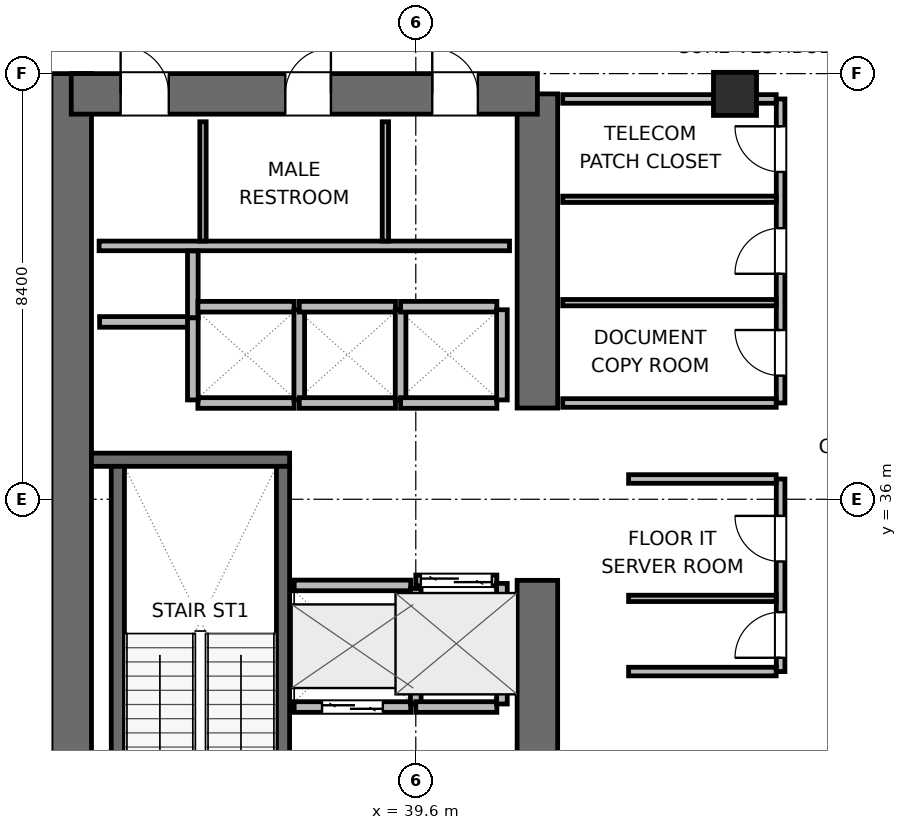
"""IFC4 building model, lengths in metres.
Left out: names, types, materials, properties, quantities, classifications, styles, units other than length and angle.
Written with IfcOpenShell. Run it as: python <this file> out.ifc"""

import sys

from ifc_helpers import new_model, si_unit, direction, frame, frame_2d, origin, origin_2d, place, context, subcontext, project, spatial, rectangle, extrude, element, fill, save


model = new_model("IFC4")
c1 = context("Model", 3, precision=1e-05, world=origin(), true_north=direction((0.0, 1.0)))
c2 = subcontext(c1, "Body", "Model", "MODEL_VIEW")
j1 = project(units=[si_unit("LENGTHUNIT", "METRE"), si_unit("PLANEANGLEUNIT", "RADIAN")], contexts=[c1])
p1 = place(None, origin())
s1 = spatial("IfcSite", under=j1, at=p1, CompositionType="ELEMENT")
p2 = place(p1, origin())
s2 = spatial("IfcBuilding", under=s1, at=p2, CompositionType="ELEMENT")
p3 = place(p2, frame((0.0, 0.0, 101.4)))
s3 = spatial("IfcBuildingStorey", under=s2, at=p3, CompositionType="ELEMENT", Elevation=101.4)
p4 = place(p3, frame((32.8, 27.6, 0.0), z_axis=(0.0, 0.0, 1.0), x_axis=(0.0, 1.0, 0.0)))
e1 = element("IfcWall", 1, at=p4, inside=s3, PredefinedType="SHEAR", context=c2, shape_type="SweptSolid", body=[
    extrude(rectangle(XDim=16.8, YDim=0.8, at=frame_2d((8.4, 0.0))), origin(), (0.0, 0.0, 1.0), 3.9),
])
p5 = place(p3, frame((42.0, 28.0, 0.0), z_axis=(0.0, 0.0, 1.0), x_axis=(0.0, 1.0, 0.0)))
e2 = element("IfcWall", 2, at=p5, inside=s3, PredefinedType="SHEAR", context=c2, shape_type="SweptSolid", body=[
    extrude(rectangle(XDim=6.4, YDim=0.8, at=frame_2d((3.2, 0.0))), origin(), (0.0, 0.0, 1.0), 3.9),
])
p6 = place(p3, frame((42.0, 37.8, 0.0), z_axis=(0.0, 0.0, 1.0), x_axis=(0.0, 1.0, 0.0)))
e3 = element("IfcWall", 3, at=p6, inside=s3, PredefinedType="SHEAR", context=c2, shape_type="SweptSolid", body=[
    extrude(rectangle(XDim=6.2, YDim=0.8, at=frame_2d((3.1, 0.0))), origin(), (0.0, 0.0, 1.0), 3.9),
])
p7 = place(p3, frame((32.8, 44.0, 0.0), z_axis=(0.0, 0.0, 1.0), x_axis=(1.0, 0.0, 0.0)))
e4 = element("IfcWall", 4, at=p7, inside=s3, PredefinedType="SHEAR", context=c2, shape_type="SweptSolid", body=[
    extrude(rectangle(XDim=9.2, YDim=0.8, at=frame_2d((4.6, 0.0))), origin(), (0.0, 0.0, 1.0), 3.9),
])
p8 = place(p7, frame((0.975, 0.0, 0.0)))
e5 = element("IfcOpeningElement", 5, at=p8, cuts=e4, PredefinedType="OPENING", context=c2, shape_type="SweptSolid", body=[
    extrude(rectangle(XDim=0.95, YDim=2.04, at=frame_2d((0.475, 1.02))), frame((0.0, 0.41, 0.0), z_axis=(0.0, -1.0, 0.0), x_axis=(1.0, 0.0, 0.0)), (0.0, 0.0, 1.0), 0.82),
])
p9 = place(p7, frame((4.225, 0.0, 0.0)))
e6 = element("IfcOpeningElement", 6, at=p9, cuts=e4, PredefinedType="OPENING", context=c2, shape_type="SweptSolid", body=[
    extrude(rectangle(XDim=0.9, YDim=2.02, at=frame_2d((0.45, 1.01))), frame((0.0, 0.41, 0.0), z_axis=(0.0, -1.0, 0.0), x_axis=(1.0, 0.0, 0.0)), (0.0, 0.0, 1.0), 0.82),
])
p10 = place(p7, frame((7.125, 0.0, 0.0)))
e7 = element("IfcOpeningElement", 7, at=p10, cuts=e4, PredefinedType="OPENING", context=c2, shape_type="SweptSolid", body=[
    extrude(rectangle(XDim=0.9, YDim=2.02, at=frame_2d((0.45, 1.01))), frame((0.0, 0.41, 0.0), z_axis=(0.0, -1.0, 0.0), x_axis=(1.0, 0.0, 0.0)), (0.0, 0.0, 1.0), 0.82),
])
p11 = place(p3, frame((33.2, 36.78, 0.0), z_axis=(0.0, 0.0, 1.0), x_axis=(1.0, 0.0, 0.0)))
e8 = element("IfcWall", 8, at=p11, inside=s3, PredefinedType="SHEAR", context=c2, shape_type="SweptSolid", body=[
    extrude(rectangle(XDim=3.91, YDim=0.26, at=frame_2d((1.955, 0.0))), origin(), (0.0, 0.0, 1.0), 3.9),
])
p12 = place(p3, frame((33.72, 29.05, 0.0), z_axis=(0.0, 0.0, 1.0), x_axis=(0.0, 1.0, 0.0)))
e9 = element("IfcWall", 9, at=p12, inside=s3, PredefinedType="SHEAR", context=c2, shape_type="SweptSolid", body=[
    extrude(rectangle(XDim=7.6, YDim=0.26, at=frame_2d((3.8, 0.0))), origin(), (0.0, 0.0, 1.0), 3.9),
])
p13 = place(p3, frame((36.98, 29.05, 0.0), z_axis=(0.0, 0.0, 1.0), x_axis=(0.0, 1.0, 0.0)))
e10 = element("IfcWall", 10, at=p13, inside=s3, PredefinedType="SHEAR", context=c2, shape_type="SweptSolid", body=[
    extrude(rectangle(XDim=7.6, YDim=0.26, at=frame_2d((3.8, 0.0))), origin(), (0.0, 0.0, 1.0), 3.9),
])
p14 = place(p13, frame((0.3, 0.0, 0.0)))
e11 = element("IfcOpeningElement", 11, at=p14, cuts=e10, PredefinedType="OPENING", context=c2, shape_type="SweptSolid", body=[
    extrude(rectangle(XDim=1.0, YDim=2.04, at=frame_2d((0.5, 1.02))), frame((0.0, 0.14, 0.0), z_axis=(0.0, -1.0, 0.0), x_axis=(1.0, 0.0, 0.0)), (0.0, 0.0, 1.0), 0.28),
])
p15 = place(p3, frame((45.9, 44.0, 0.0), z_axis=(0.0, 0.0, 1.0), x_axis=(1.0, 0.0, 0.0)))
e12 = element("IfcColumn", 12, at=p15, inside=s3, PredefinedType="COLUMN", context=c2, shape_type="SweptSolid", body=[
    extrude(rectangle(XDim=0.85, YDim=0.85, at=origin_2d()), origin(), (0.0, 0.0, 1.0), 3.9),
])
p16 = place(p3, frame((33.35, 41.0, 0.0), z_axis=(0.0, 0.0, 1.0), x_axis=(1.0, 0.0, 0.0)))
e13 = element("IfcWall", 13, at=p16, inside=s3, PredefinedType="PLUMBINGWALL", context=c2, shape_type="SweptSolid", body=[
    extrude(rectangle(XDim=8.1, YDim=0.19, at=frame_2d((4.05, 0.0))), origin(), (0.0, 0.0, 1.0), 3.64),
])
for number, where, z_axis, x_axis in (
    (14, (35.4, 41.095, 0.0), (0.0, 0.0, 1.0), (0.0, 1.0, 0.0)),
    (15, (39.0, 41.095, 0.0), (0.0, 0.0, 1.0), (0.0, 1.0, 0.0)),
):
    element("IfcWall", number, at=place(p3, frame(where, z_axis=z_axis, x_axis=x_axis)), inside=s3, PredefinedType="PARTITIONING", context=c2, shape_type="SweptSolid", body=[
        extrude(rectangle(XDim=2.355, YDim=0.125, at=frame_2d((1.177, 0.0))), origin(), (0.0, 0.0, 1.0), 3.64),
    ])
p17 = place(p3, frame((33.36, 39.5, 0.0), z_axis=(0.0, 0.0, 1.0), x_axis=(1.0, 0.0, 0.0)))
e16 = element("IfcWall", 16, at=p17, inside=s3, PredefinedType="PARTITIONING", context=c2, shape_type="SweptSolid", body=[
    extrude(rectangle(XDim=1.86, YDim=0.21, at=frame_2d((0.93, 0.0))), origin(), (0.0, 0.0, 1.0), 3.64),
])
p18 = place(p3, frame((35.2, 39.58, 0.0), z_axis=(0.0, 0.0, 1.0), x_axis=(0.0, 1.0, 0.0)))
e17 = element("IfcWall", 17, at=p18, inside=s3, PredefinedType="PARTITIONING", context=c2, shape_type="SweptSolid", body=[
    extrude(rectangle(XDim=1.32, YDim=0.21, at=frame_2d((0.66, 0.0))), origin(), (0.0, 0.0, 1.0), 3.64),
])
p19 = place(p3, frame((37.2, 31.9, 0.0), z_axis=(0.0, 0.0, 1.0), x_axis=(1.0, 0.0, 0.0)))
e18 = element("IfcWall", 18, at=p19, inside=s3, PredefinedType="PARTITIONING", context=c2, shape_type="SweptSolid", body=[
    extrude(rectangle(XDim=2.3, YDim=0.21, at=frame_2d((1.15, 0.0))), origin(), (0.0, 0.0, 1.0), 3.64),
])
p20 = place(p19, frame((0.55, 0.0, 0.0)))
e19 = element("IfcOpeningElement", 19, at=p20, cuts=e18, PredefinedType="OPENING", context=c2, shape_type="SweptSolid", body=[
    extrude(rectangle(XDim=1.2, YDim=2.04, at=frame_2d((0.6, 1.02))), frame((0.0, 0.115, 0.0), z_axis=(0.0, -1.0, 0.0), x_axis=(1.0, 0.0, 0.0)), (0.0, 0.0, 1.0), 0.23),
])
p21 = place(p3, frame((37.2, 34.3, 0.0), z_axis=(0.0, 0.0, 1.0), x_axis=(1.0, 0.0, 0.0)))
e20 = element("IfcWall", 20, at=p21, inside=s3, PredefinedType="PARTITIONING", context=c2, shape_type="SweptSolid", body=[
    extrude(rectangle(XDim=2.3, YDim=0.21, at=frame_2d((1.15, 0.0))), origin(), (0.0, 0.0, 1.0), 3.64),
])
p22 = place(p3, frame((39.6, 31.96, 0.0), z_axis=(0.0, 0.0, 1.0), x_axis=(0.0, 1.0, 0.0)))
e21 = element("IfcWall", 21, at=p22, inside=s3, PredefinedType="PARTITIONING", context=c2, shape_type="SweptSolid", body=[
    extrude(rectangle(XDim=2.28, YDim=0.21, at=frame_2d((1.14, 0.0))), origin(), (0.0, 0.0, 1.0), 3.64),
])
p23 = place(p3, frame((39.6, 34.4, 0.0), z_axis=(0.0, 0.0, 1.0), x_axis=(1.0, 0.0, 0.0)))
e22 = element("IfcWall", 22, at=p23, inside=s3, PredefinedType="PARTITIONING", context=c2, shape_type="SweptSolid", body=[
    extrude(rectangle(XDim=1.6, YDim=0.21, at=frame_2d((0.8, 0.0))), origin(), (0.0, 0.0, 1.0), 3.64),
])
p24 = place(p23, frame((0.1, 0.0, 0.0)))
e23 = element("IfcOpeningElement", 23, at=p24, cuts=e22, PredefinedType="OPENING", context=c2, shape_type="SweptSolid", body=[
    extrude(rectangle(XDim=1.4, YDim=2.06, at=frame_2d((0.7, 1.03))), frame((0.0, 0.115, 0.0), z_axis=(0.0, -1.0, 0.0), x_axis=(1.0, 0.0, 0.0)), (0.0, 0.0, 1.0), 0.23),
])
p25 = place(p3, frame((39.6, 31.9, 0.0), z_axis=(0.0, 0.0, 1.0), x_axis=(1.0, 0.0, 0.0)))
e24 = element("IfcWall", 24, at=p25, inside=s3, PredefinedType="PARTITIONING", context=c2, shape_type="SweptSolid", body=[
    extrude(rectangle(XDim=1.6, YDim=0.21, at=frame_2d((0.8, 0.0))), origin(), (0.0, 0.0, 1.0), 3.64),
])
p26 = place(p3, frame((41.3, 31.96, 0.0), z_axis=(0.0, 0.0, 1.0), x_axis=(0.0, 1.0, 0.0)))
e25 = element("IfcWall", 25, at=p26, inside=s3, PredefinedType="PARTITIONING", context=c2, shape_type="SweptSolid", body=[
    extrude(rectangle(XDim=2.38, YDim=0.21, at=frame_2d((1.19, 0.0))), origin(), (0.0, 0.0, 1.0), 3.64),
])
for number, where, z_axis, x_axis in (
    (26, (35.3, 37.9, 0.0), (0.0, 0.0, 1.0), (1.0, 0.0, 0.0)),
    (27, (35.3, 39.8, 0.0), (0.0, 0.0, 1.0), (1.0, 0.0, 0.0)),
):
    element("IfcWall", number, at=place(p3, frame(where, z_axis=z_axis, x_axis=x_axis)), inside=s3, PredefinedType="PARTITIONING", context=c2, shape_type="SweptSolid", body=[
        extrude(rectangle(XDim=1.9, YDim=0.21, at=frame_2d((0.95, 0.0))), origin(), (0.0, 0.0, 1.0), 3.64),
    ])
p27 = place(p3, frame((35.2, 37.96, 0.0), z_axis=(0.0, 0.0, 1.0), x_axis=(0.0, 1.0, 0.0)))
e28 = element("IfcWall", 28, at=p27, inside=s3, PredefinedType="PARTITIONING", context=c2, shape_type="SweptSolid", body=[
    extrude(rectangle(XDim=1.62, YDim=0.21, at=frame_2d((0.81, 0.0))), origin(), (0.0, 0.0, 1.0), 3.64),
])
p28 = place(p3, frame((37.3, 37.96, 0.0), z_axis=(0.0, 0.0, 1.0), x_axis=(0.0, 1.0, 0.0)))
e29 = element("IfcWall", 29, at=p28, inside=s3, PredefinedType="PARTITIONING", context=c2, shape_type="SweptSolid", body=[
    extrude(rectangle(XDim=1.78, YDim=0.21, at=frame_2d((0.89, 0.0))), origin(), (0.0, 0.0, 1.0), 3.64),
])
for number, where, z_axis, x_axis in (
    (30, (37.3, 37.9, 0.0), (0.0, 0.0, 1.0), (1.0, 0.0, 0.0)),
    (31, (37.3, 39.8, 0.0), (0.0, 0.0, 1.0), (1.0, 0.0, 0.0)),
):
    element("IfcWall", number, at=place(p3, frame(where, z_axis=z_axis, x_axis=x_axis)), inside=s3, PredefinedType="PARTITIONING", context=c2, shape_type="SweptSolid", body=[
        extrude(rectangle(XDim=1.9, YDim=0.21, at=frame_2d((0.95, 0.0))), origin(), (0.0, 0.0, 1.0), 3.64),
    ])
p29 = place(p3, frame((39.3, 37.96, 0.0), z_axis=(0.0, 0.0, 1.0), x_axis=(0.0, 1.0, 0.0)))
e32 = element("IfcWall", 32, at=p29, inside=s3, PredefinedType="PARTITIONING", context=c2, shape_type="SweptSolid", body=[
    extrude(rectangle(XDim=1.78, YDim=0.21, at=frame_2d((0.89, 0.0))), origin(), (0.0, 0.0, 1.0), 3.64),
])
for number, where, z_axis, x_axis in (
    (33, (39.3, 37.9, 0.0), (0.0, 0.0, 1.0), (1.0, 0.0, 0.0)),
    (34, (39.3, 39.8, 0.0), (0.0, 0.0, 1.0), (1.0, 0.0, 0.0)),
):
    element("IfcWall", number, at=place(p3, frame(where, z_axis=z_axis, x_axis=x_axis)), inside=s3, PredefinedType="PARTITIONING", context=c2, shape_type="SweptSolid", body=[
        extrude(rectangle(XDim=1.9, YDim=0.21, at=frame_2d((0.95, 0.0))), origin(), (0.0, 0.0, 1.0), 3.64),
    ])
p30 = place(p3, frame((41.3, 37.96, 0.0), z_axis=(0.0, 0.0, 1.0), x_axis=(0.0, 1.0, 0.0)))
e35 = element("IfcWall", 35, at=p30, inside=s3, PredefinedType="PARTITIONING", context=c2, shape_type="SweptSolid", body=[
    extrude(rectangle(XDim=1.78, YDim=0.21, at=frame_2d((0.89, 0.0))), origin(), (0.0, 0.0, 1.0), 3.64),
])
p31 = place(p3, frame((46.8, 32.6, 0.0), z_axis=(0.0, 0.0, 1.0), x_axis=(0.0, 1.0, 0.0)))
e36 = element("IfcWall", 36, at=p31, inside=s3, PredefinedType="PARTITIONING", context=c2, shape_type="SweptSolid", body=[
    extrude(rectangle(XDim=3.8, YDim=0.17, at=frame_2d((1.9, 0.0))), origin(), (0.0, 0.0, 1.0), 3.64),
])
p32 = place(p31, frame((0.272, 0.0, 0.0)))
e37 = element("IfcOpeningElement", 37, at=p32, cuts=e36, PredefinedType="OPENING", context=c2, shape_type="SweptSolid", body=[
    extrude(rectangle(XDim=0.9, YDim=2.02, at=frame_2d((0.45, 1.01))), frame((0.0, 0.095, 0.0), z_axis=(0.0, -1.0, 0.0), x_axis=(1.0, 0.0, 0.0)), (0.0, 0.0, 1.0), 0.19),
])
p33 = place(p31, frame((2.172, 0.0, 0.0)))
e38 = element("IfcOpeningElement", 38, at=p33, cuts=e36, PredefinedType="OPENING", context=c2, shape_type="SweptSolid", body=[
    extrude(rectangle(XDim=0.9, YDim=2.02, at=frame_2d((0.45, 1.01))), frame((0.0, 0.095, 0.0), z_axis=(0.0, -1.0, 0.0), x_axis=(1.0, 0.0, 0.0)), (0.0, 0.0, 1.0), 0.19),
])
for number, where, z_axis, x_axis in (
    (39, (43.8, 32.6, 0.0), (0.0, 0.0, 1.0), (1.0, 0.0, 0.0)),
    (40, (43.8, 36.4, 0.0), (0.0, 0.0, 1.0), (1.0, 0.0, 0.0)),
):
    element("IfcWall", number, at=place(p3, frame(where, z_axis=z_axis, x_axis=x_axis)), inside=s3, PredefinedType="PARTITIONING", context=c2, shape_type="SweptSolid", body=[
        extrude(rectangle(XDim=2.913, YDim=0.17, at=frame_2d((1.457, 0.0))), origin(), (0.0, 0.0, 1.0), 3.64),
    ])
p34 = place(p3, frame((43.8, 34.044, 0.0), z_axis=(0.0, 0.0, 1.0), x_axis=(1.0, 0.0, 0.0)))
e41 = element("IfcWall", 41, at=p34, inside=s3, PredefinedType="PARTITIONING", context=c2, shape_type="SweptSolid", body=[
    extrude(rectangle(XDim=2.913, YDim=0.125, at=frame_2d((1.457, 0.0))), origin(), (0.0, 0.0, 1.0), 3.64),
])
p35 = place(p3, frame((46.8, 37.9, 0.0), z_axis=(0.0, 0.0, 1.0), x_axis=(0.0, 1.0, 0.0)))
e42 = element("IfcWall", 42, at=p35, inside=s3, PredefinedType="PARTITIONING", context=c2, shape_type="SweptSolid", body=[
    extrude(rectangle(XDim=6.0, YDim=0.17, at=frame_2d((3.0, 0.0))), origin(), (0.0, 0.0, 1.0), 3.64),
])
p36 = place(p35, frame((0.54, 0.0, 0.0)))
e43 = element("IfcOpeningElement", 43, at=p36, cuts=e42, PredefinedType="OPENING", context=c2, shape_type="SweptSolid", body=[
    extrude(rectangle(XDim=0.9, YDim=2.02, at=frame_2d((0.45, 1.01))), frame((0.0, 0.095, 0.0), z_axis=(0.0, -1.0, 0.0), x_axis=(1.0, 0.0, 0.0)), (0.0, 0.0, 1.0), 0.19),
])
p37 = place(p35, frame((2.55, 0.0, 0.0)))
e44 = element("IfcOpeningElement", 44, at=p37, cuts=e42, PredefinedType="OPENING", context=c2, shape_type="SweptSolid", body=[
    extrude(rectangle(XDim=0.9, YDim=2.02, at=frame_2d((0.45, 1.01))), frame((0.0, 0.095, 0.0), z_axis=(0.0, -1.0, 0.0), x_axis=(1.0, 0.0, 0.0)), (0.0, 0.0, 1.0), 0.19),
])
p38 = place(p35, frame((4.56, 0.0, 0.0)))
e45 = element("IfcOpeningElement", 45, at=p38, cuts=e42, PredefinedType="OPENING", context=c2, shape_type="SweptSolid", body=[
    extrude(rectangle(XDim=0.9, YDim=2.02, at=frame_2d((0.45, 1.01))), frame((0.0, 0.095, 0.0), z_axis=(0.0, -1.0, 0.0), x_axis=(1.0, 0.0, 0.0)), (0.0, 0.0, 1.0), 0.19),
])
p39 = place(p3, frame((42.5, 37.9, 0.0), z_axis=(0.0, 0.0, 1.0), x_axis=(1.0, 0.0, 0.0)))
e46 = element("IfcWall", 46, at=p39, inside=s3, PredefinedType="PARTITIONING", context=c2, shape_type="SweptSolid", body=[
    extrude(rectangle(XDim=4.213, YDim=0.17, at=frame_2d((2.106, 0.0))), origin(), (0.0, 0.0, 1.0), 3.64),
])
p40 = place(p3, frame((42.5, 43.9, 0.0), z_axis=(0.0, 0.0, 1.0), x_axis=(1.0, 0.0, 0.0)))
e47 = element("IfcWall", 47, at=p40, inside=s3, PredefinedType="PARTITIONING", context=c2, shape_type="SweptSolid", body=[
    extrude(rectangle(XDim=4.213, YDim=0.17, at=frame_2d((2.106, 0.0))), origin(), (0.0, 0.0, 1.0), 2.525),
])
for number, where, z_axis, x_axis in (
    (48, (42.5, 39.88, 0.0), (0.0, 0.0, 1.0), (1.0, 0.0, 0.0)),
    (49, (42.5, 41.92, 0.0), (0.0, 0.0, 1.0), (1.0, 0.0, 0.0)),
):
    element("IfcWall", number, at=place(p3, frame(where, z_axis=z_axis, x_axis=x_axis)), inside=s3, PredefinedType="PARTITIONING", context=c2, shape_type="SweptSolid", body=[
        extrude(rectangle(XDim=4.213, YDim=0.125, at=frame_2d((2.106, 0.0))), origin(), (0.0, 0.0, 1.0), 3.64),
    ])
p41 = place(p20, origin())
e50 = element("IfcDoor", 50, at=p41, inside=s3, OperationType="DOUBLE_DOOR_SLIDING", PredefinedType="DOOR", context=c2, shape_type="SweptSolid", body=[
    extrude(rectangle(XDim=1.2, YDim=2.04, at=frame_2d((0.6, 1.02))), frame((0.0, 0.025, 0.0), z_axis=(0.0, -1.0, 0.0), x_axis=(1.0, 0.0, 0.0)), (0.0, 0.0, 1.0), 0.05),
])
fill(e19, e50)
p42 = place(p24, origin())
e51 = element("IfcDoor", 51, at=p42, inside=s3, OperationType="DOUBLE_DOOR_SLIDING", PredefinedType="DOOR", context=c2, shape_type="SweptSolid", body=[
    extrude(rectangle(XDim=1.4, YDim=2.06, at=frame_2d((0.7, 1.03))), frame((0.0, 0.025, 0.0), z_axis=(0.0, -1.0, 0.0), x_axis=(1.0, 0.0, 0.0)), (0.0, 0.0, 1.0), 0.05),
])
fill(e23, e51)
p43 = place(p8, origin())
e52 = element("IfcDoor", 52, at=p43, inside=s3, OperationType="SINGLE_SWING_LEFT", PredefinedType="DOOR", context=c2, shape_type="SweptSolid", body=[
    extrude(rectangle(XDim=0.95, YDim=2.04, at=frame_2d((0.475, 1.02))), frame((0.0, 0.025, 0.0), z_axis=(0.0, -1.0, 0.0), x_axis=(1.0, 0.0, 0.0)), (0.0, 0.0, 1.0), 0.05),
])
fill(e5, e52)
p44 = place(p9, origin())
e53 = element("IfcDoor", 53, at=p44, inside=s3, OperationType="SINGLE_SWING_RIGHT", PredefinedType="DOOR", context=c2, shape_type="SweptSolid", body=[
    extrude(rectangle(XDim=0.9, YDim=2.02, at=frame_2d((0.45, 1.01))), frame((0.0, 0.025, 0.0), z_axis=(0.0, -1.0, 0.0), x_axis=(1.0, 0.0, 0.0)), (0.0, 0.0, 1.0), 0.05),
])
fill(e6, e53)
p45 = place(p10, origin())
e54 = element("IfcDoor", 54, at=p45, inside=s3, OperationType="SINGLE_SWING_LEFT", PredefinedType="DOOR", context=c2, shape_type="SweptSolid", body=[
    extrude(rectangle(XDim=0.9, YDim=2.02, at=frame_2d((0.45, 1.01))), frame((0.0, 0.025, 0.0), z_axis=(0.0, -1.0, 0.0), x_axis=(1.0, 0.0, 0.0)), (0.0, 0.0, 1.0), 0.05),
])
fill(e7, e54)
p46 = place(p32, origin())
e55 = element("IfcDoor", 55, at=p46, inside=s3, OperationType="SINGLE_SWING_LEFT", PredefinedType="DOOR", context=c2, shape_type="SweptSolid", body=[
    extrude(rectangle(XDim=0.9, YDim=2.02, at=frame_2d((0.45, 1.01))), frame((0.0, 0.025, 0.0), z_axis=(0.0, -1.0, 0.0), x_axis=(1.0, 0.0, 0.0)), (0.0, 0.0, 1.0), 0.05),
])
fill(e37, e55)
p47 = place(p33, origin())
e56 = element("IfcDoor", 56, at=p47, inside=s3, OperationType="SINGLE_SWING_RIGHT", PredefinedType="DOOR", context=c2, shape_type="SweptSolid", body=[
    extrude(rectangle(XDim=0.9, YDim=2.02, at=frame_2d((0.45, 1.01))), frame((0.0, 0.025, 0.0), z_axis=(0.0, -1.0, 0.0), x_axis=(1.0, 0.0, 0.0)), (0.0, 0.0, 1.0), 0.05),
])
fill(e38, e56)
p48 = place(p36, origin())
e57 = element("IfcDoor", 57, at=p48, inside=s3, OperationType="SINGLE_SWING_RIGHT", PredefinedType="DOOR", context=c2, shape_type="SweptSolid", body=[
    extrude(rectangle(XDim=0.9, YDim=2.02, at=frame_2d((0.45, 1.01))), frame((0.0, 0.025, 0.0), z_axis=(0.0, -1.0, 0.0), x_axis=(1.0, 0.0, 0.0)), (0.0, 0.0, 1.0), 0.05),
])
fill(e43, e57)
p49 = place(p37, origin())
e58 = element("IfcDoor", 58, at=p49, inside=s3, OperationType="SINGLE_SWING_LEFT", PredefinedType="DOOR", context=c2, shape_type="SweptSolid", body=[
    extrude(rectangle(XDim=0.9, YDim=2.02, at=frame_2d((0.45, 1.01))), frame((0.0, 0.025, 0.0), z_axis=(0.0, -1.0, 0.0), x_axis=(1.0, 0.0, 0.0)), (0.0, 0.0, 1.0), 0.05),
])
fill(e44, e58)
p50 = place(p38, origin())
e59 = element("IfcDoor", 59, at=p50, inside=s3, OperationType="SINGLE_SWING_RIGHT", PredefinedType="DOOR", context=c2, shape_type="SweptSolid", body=[
    extrude(rectangle(XDim=0.9, YDim=2.02, at=frame_2d((0.45, 1.01))), frame((0.0, 0.025, 0.0), z_axis=(0.0, -1.0, 0.0), x_axis=(1.0, 0.0, 0.0)), (0.0, 0.0, 1.0), 0.05),
])
fill(e45, e59)
save(model, sys.argv[1])
